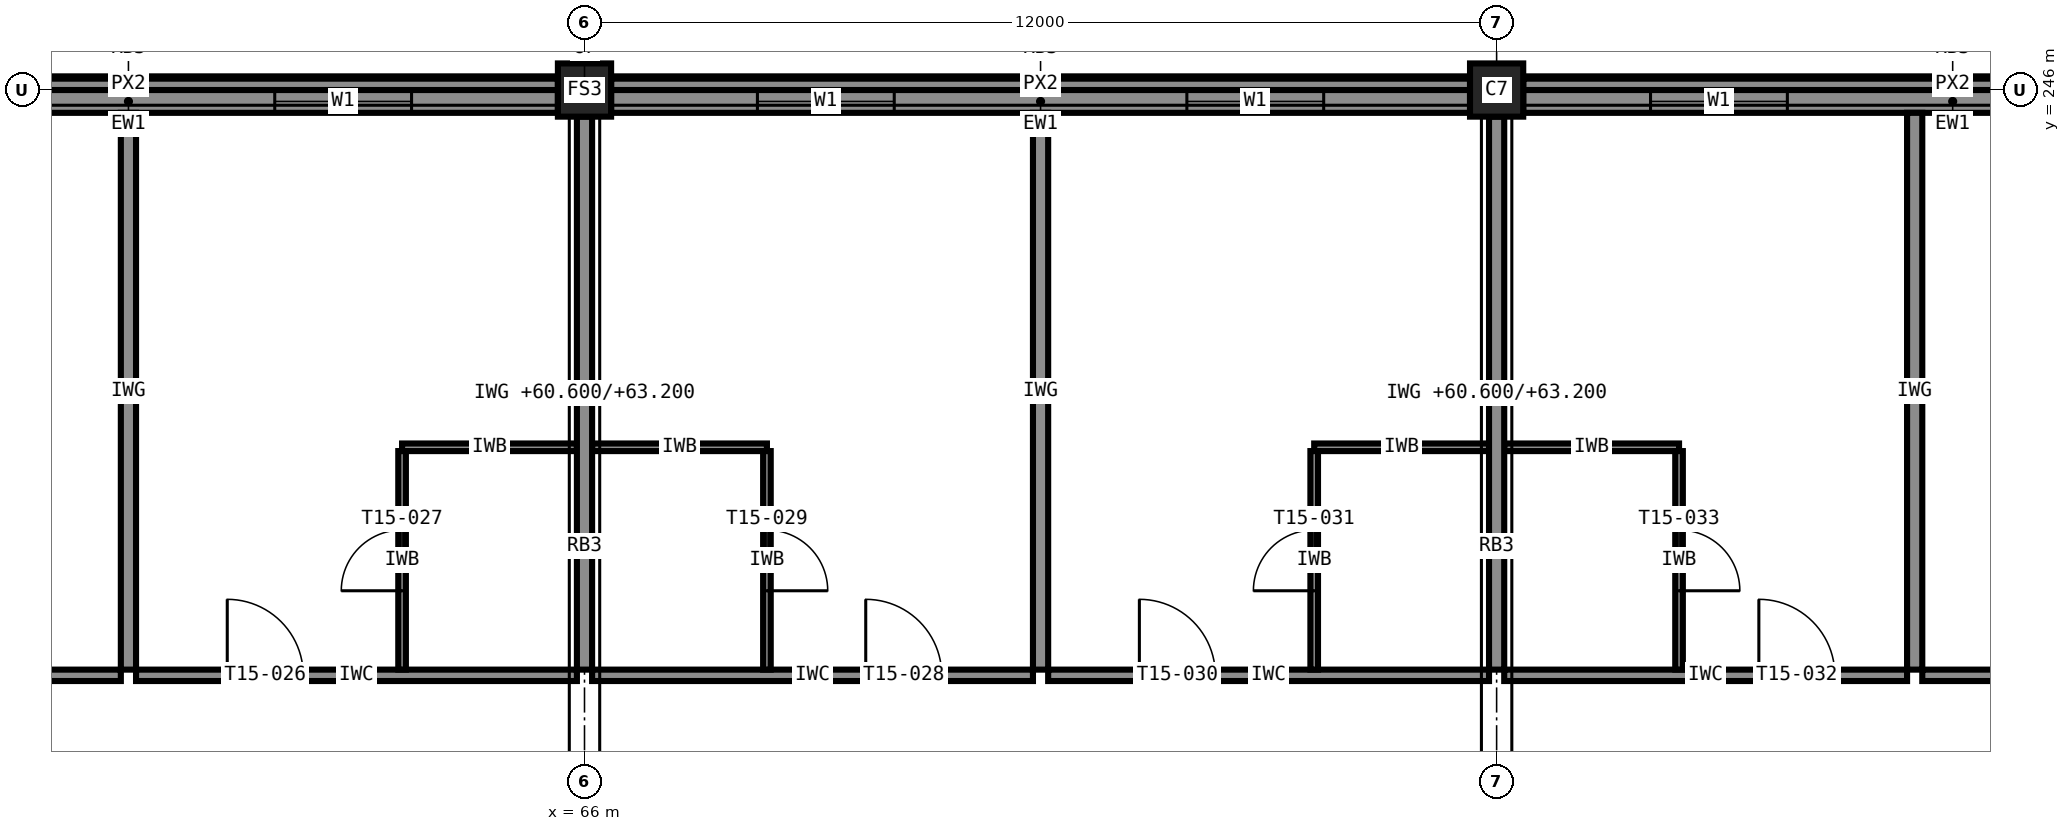
"""IFC4 building model, lengths in metres.
Left out: names, types, materials, properties, quantities, classifications, styles, units other than length and angle.
Written with IfcOpenShell. Run it as: python <this file> out.ifc"""

import sys

from ifc_helpers import new_model, si_unit, direction, frame, frame_2d, origin, origin_2d, place, context, subcontext, project, spatial, rectangle, extrude, element, fill, save


model = new_model("IFC4")
c1 = context("Model", 3, precision=1e-05, world=origin(), true_north=direction((0.0, 1.0)))
c2 = subcontext(c1, "Body", "Model", "MODEL_VIEW")
j1 = project(units=[si_unit("LENGTHUNIT", "METRE"), si_unit("PLANEANGLEUNIT", "RADIAN")], contexts=[c1])
p1 = place(None, origin())
s1 = spatial("IfcSite", under=j1, at=p1, CompositionType="ELEMENT")
p2 = place(p1, origin())
s2 = spatial("IfcBuilding", under=s1, at=p2, CompositionType="ELEMENT")
p3 = place(p2, frame((0.0, 0.0, 60.6)))
s3 = spatial("IfcBuildingStorey", under=s2, at=p3, CompositionType="ELEMENT", Elevation=60.6)
for number, where, z_axis, x_axis in (
    (1, (66.0, 246.0, 0.0), (0.0, 0.0, 1.0), (1.0, 0.0, 0.0)),
    (2, (78.0, 246.0, 0.0), (0.0, 0.0, 1.0), (1.0, 0.0, 0.0)),
):
    element("IfcColumn", number, at=place(p3, frame(where, z_axis=z_axis, x_axis=x_axis)), inside=s3, PredefinedType="COLUMN", context=c2, shape_type="SweptSolid", body=[
        extrude(rectangle(XDim=0.7, YDim=0.7, at=origin_2d()), origin(), (0.0, 0.0, 1.0), 3.6),
    ])
p4 = place(p3, frame((89.65, 245.85, 0.0), z_axis=(0.0, 0.0, 1.0), x_axis=(-1.0, 0.0, 0.0)))
e3 = element("IfcWall", 3, at=p4, inside=s3, PredefinedType="STANDARD", context=c2, shape_type="SweptSolid", body=[
    extrude(rectangle(XDim=11.3, YDim=0.3, at=frame_2d((5.65, 0.0))), origin(), (0.0, 0.0, 1.0), 2.6),
])
p5 = place(p4, frame((7.825, 0.0, 0.85)))
e4 = element("IfcOpeningElement", 4, at=p5, cuts=e3, PredefinedType="OPENING", context=c2, shape_type="SweptSolid", body=[
    extrude(rectangle(XDim=1.8, YDim=1.75, at=frame_2d((0.9, 0.875))), frame((0.0, 0.16, 0.0), z_axis=(0.0, -1.0, 0.0), x_axis=(1.0, 0.0, 0.0)), (0.0, 0.0, 1.0), 0.32),
])
p6 = place(p4, frame((2.25, 0.0, 0.85)))
e5 = element("IfcOpeningElement", 5, at=p6, cuts=e3, PredefinedType="OPENING", context=c2, shape_type="SweptSolid", body=[
    extrude(rectangle(XDim=1.8, YDim=1.75, at=frame_2d((0.9, 0.875))), frame((0.0, 0.16, 0.0), z_axis=(0.0, -1.0, 0.0), x_axis=(1.0, 0.0, 0.0)), (0.0, 0.0, 1.0), 0.32),
])
p7 = place(p3, frame((77.65, 245.85, 0.0), z_axis=(0.0, 0.0, 1.0), x_axis=(-1.0, 0.0, 0.0)))
e6 = element("IfcWall", 6, at=p7, inside=s3, PredefinedType="STANDARD", context=c2, shape_type="SweptSolid", body=[
    extrude(rectangle(XDim=11.3, YDim=0.3, at=frame_2d((5.65, 0.0))), origin(), (0.0, 0.0, 1.0), 2.6),
])
p8 = place(p7, frame((7.575, 0.0, 0.85)))
e7 = element("IfcOpeningElement", 7, at=p8, cuts=e6, PredefinedType="OPENING", context=c2, shape_type="SweptSolid", body=[
    extrude(rectangle(XDim=1.8, YDim=1.75, at=frame_2d((0.9, 0.875))), frame((0.0, 0.16, 0.0), z_axis=(0.0, -1.0, 0.0), x_axis=(1.0, 0.0, 0.0)), (0.0, 0.0, 1.0), 0.32),
])
p9 = place(p7, frame((1.925, 0.0, 0.85)))
e8 = element("IfcOpeningElement", 8, at=p9, cuts=e6, PredefinedType="OPENING", context=c2, shape_type="SweptSolid", body=[
    extrude(rectangle(XDim=1.8, YDim=1.75, at=frame_2d((0.9, 0.875))), frame((0.0, 0.16, 0.0), z_axis=(0.0, -1.0, 0.0), x_axis=(1.0, 0.0, 0.0)), (0.0, 0.0, 1.0), 0.32),
])
p10 = place(p3, frame((65.65, 245.85, 0.0), z_axis=(0.0, 0.0, 1.0), x_axis=(-1.0, 0.0, 0.0)))
e9 = element("IfcWall", 9, at=p10, inside=s3, PredefinedType="STANDARD", context=c2, shape_type="SweptSolid", body=[
    extrude(rectangle(XDim=11.3, YDim=0.3, at=frame_2d((5.65, 0.0))), origin(), (0.0, 0.0, 1.0), 2.6),
])
p11 = place(p10, frame((7.575, 0.0, 0.85)))
e10 = element("IfcOpeningElement", 10, at=p11, cuts=e9, PredefinedType="OPENING", context=c2, shape_type="SweptSolid", body=[
    extrude(rectangle(XDim=1.8, YDim=1.75, at=frame_2d((0.9, 0.875))), frame((0.0, 0.16, 0.0), z_axis=(0.0, -1.0, 0.0), x_axis=(1.0, 0.0, 0.0)), (0.0, 0.0, 1.0), 0.32),
])
p12 = place(p10, frame((1.925, 0.0, 0.85)))
e11 = element("IfcOpeningElement", 11, at=p12, cuts=e9, PredefinedType="OPENING", context=c2, shape_type="SweptSolid", body=[
    extrude(rectangle(XDim=1.8, YDim=1.75, at=frame_2d((0.9, 0.875))), frame((0.0, 0.16, 0.0), z_axis=(0.0, -1.0, 0.0), x_axis=(1.0, 0.0, 0.0)), (0.0, 0.0, 1.0), 0.32),
])
for number, where, z_axis, x_axis in (
    (12, (89.65, 246.075, 3.4), (0.0, 0.0, 1.0), (-1.0, 0.0, 0.0)),
    (13, (77.65, 246.075, 3.4), (0.0, 0.0, 1.0), (-1.0, 0.0, 0.0)),
    (14, (65.65, 246.075, 3.4), (0.0, 0.0, 1.0), (-1.0, 0.0, 0.0)),
):
    element("IfcWall", number, at=place(p3, frame(where, z_axis=z_axis, x_axis=x_axis)), inside=s3, PredefinedType="STANDARD", context=c2, shape_type="SweptSolid", body=[
        extrude(rectangle(XDim=11.3, YDim=0.15, at=frame_2d((5.65, 0.0))), origin(), (0.0, 0.0, 1.0), 0.2),
    ])
p13 = place(p3, frame((54.1, 238.3, 0.0), z_axis=(0.0, 0.0, 1.0), x_axis=(1.0, 0.0, 0.0)))
e15 = element("IfcWall", 15, at=p13, inside=s3, PredefinedType="PARTITIONING", context=c2, shape_type="SweptSolid", body=[
    extrude(rectangle(XDim=5.8, YDim=0.15, at=frame_2d((2.9, 0.0))), origin(), (0.0, 0.0, 1.0), 3.4),
])
p14 = place(p13, frame((3.6, 0.0, 0.0)))
e16 = element("IfcOpeningElement", 16, at=p14, cuts=e15, PredefinedType="OPENING", context=c2, shape_type="SweptSolid", body=[
    extrude(rectangle(XDim=1.0, YDim=2.1, at=frame_2d((0.5, 1.05))), frame((0.0, 0.085, 0.0), z_axis=(0.0, -1.0, 0.0), x_axis=(1.0, 0.0, 0.0)), (0.0, 0.0, 1.0), 0.17),
])
p15 = place(p3, frame((60.1, 238.3, 0.0), z_axis=(0.0, 0.0, 1.0), x_axis=(1.0, 0.0, 0.0)))
e17 = element("IfcWall", 17, at=p15, inside=s3, PredefinedType="PARTITIONING", context=c2, shape_type="SweptSolid", body=[
    extrude(rectangle(XDim=5.8, YDim=0.15, at=frame_2d((2.9, 0.0))), origin(), (0.0, 0.0, 1.0), 3.4),
])
p16 = place(p15, frame((1.2, 0.0, 0.0)))
e18 = element("IfcOpeningElement", 18, at=p16, cuts=e17, PredefinedType="OPENING", context=c2, shape_type="SweptSolid", body=[
    extrude(rectangle(XDim=1.0, YDim=2.1, at=frame_2d((0.5, 1.05))), frame((0.0, 0.085, 0.0), z_axis=(0.0, -1.0, 0.0), x_axis=(1.0, 0.0, 0.0)), (0.0, 0.0, 1.0), 0.17),
])
p17 = place(p3, frame((63.6, 241.3, 0.0), z_axis=(0.0, 0.0, 1.0), x_axis=(1.0, 0.0, 0.0)))
e19 = element("IfcWall", 19, at=p17, inside=s3, PredefinedType="PARTITIONING", context=c2, shape_type="SweptSolid", body=[
    extrude(rectangle(XDim=2.3, YDim=0.1, at=frame_2d((1.15, 0.0))), origin(), (0.0, 0.0, 1.0), 3.4),
])
p18 = place(p3, frame((63.6, 238.375, 0.0), z_axis=(0.0, 0.0, 1.0), x_axis=(0.0, 1.0, 0.0)))
e20 = element("IfcWall", 20, at=p18, inside=s3, PredefinedType="PARTITIONING", context=c2, shape_type="SweptSolid", body=[
    extrude(rectangle(XDim=2.875, YDim=0.1, at=frame_2d((1.438, 0.0))), origin(), (0.0, 0.0, 1.0), 3.4),
])
p19 = place(p18, frame((1.038, 0.0, 0.0)))
e21 = element("IfcOpeningElement", 21, at=p19, cuts=e20, PredefinedType="OPENING", context=c2, shape_type="SweptSolid", body=[
    extrude(rectangle(XDim=0.8, YDim=2.1, at=frame_2d((0.4, 1.05))), frame((0.0, 0.06, 0.0), z_axis=(0.0, -1.0, 0.0), x_axis=(1.0, 0.0, 0.0)), (0.0, 0.0, 1.0), 0.12),
])
p20 = place(p3, frame((66.1, 238.3, 0.0), z_axis=(0.0, 0.0, 1.0), x_axis=(1.0, 0.0, 0.0)))
e22 = element("IfcWall", 22, at=p20, inside=s3, PredefinedType="PARTITIONING", context=c2, shape_type="SweptSolid", body=[
    extrude(rectangle(XDim=5.8, YDim=0.15, at=frame_2d((2.9, 0.0))), origin(), (0.0, 0.0, 1.0), 3.4),
])
p21 = place(p20, frame((3.6, 0.0, 0.0)))
e23 = element("IfcOpeningElement", 23, at=p21, cuts=e22, PredefinedType="OPENING", context=c2, shape_type="SweptSolid", body=[
    extrude(rectangle(XDim=1.0, YDim=2.1, at=frame_2d((0.5, 1.05))), frame((0.0, 0.085, 0.0), z_axis=(0.0, -1.0, 0.0), x_axis=(1.0, 0.0, 0.0)), (0.0, 0.0, 1.0), 0.17),
])
p22 = place(p3, frame((66.1, 241.3, 0.0), z_axis=(0.0, 0.0, 1.0), x_axis=(1.0, 0.0, 0.0)))
e24 = element("IfcWall", 24, at=p22, inside=s3, PredefinedType="PARTITIONING", context=c2, shape_type="SweptSolid", body=[
    extrude(rectangle(XDim=2.3, YDim=0.1, at=frame_2d((1.15, 0.0))), origin(), (0.0, 0.0, 1.0), 3.4),
])
p23 = place(p3, frame((68.4, 241.25, 0.0), z_axis=(0.0, 0.0, 1.0), x_axis=(0.0, -1.0, 0.0)))
e25 = element("IfcWall", 25, at=p23, inside=s3, PredefinedType="PARTITIONING", context=c2, shape_type="SweptSolid", body=[
    extrude(rectangle(XDim=2.875, YDim=0.1, at=frame_2d((1.438, 0.0))), origin(), (0.0, 0.0, 1.0), 3.4),
])
p24 = place(p23, frame((1.038, 0.0, 0.0)))
e26 = element("IfcOpeningElement", 26, at=p24, cuts=e25, PredefinedType="OPENING", context=c2, shape_type="SweptSolid", body=[
    extrude(rectangle(XDim=0.8, YDim=2.1, at=frame_2d((0.4, 1.05))), frame((0.0, 0.06, 0.0), z_axis=(0.0, -1.0, 0.0), x_axis=(1.0, 0.0, 0.0)), (0.0, 0.0, 1.0), 0.12),
])
p25 = place(p3, frame((72.1, 238.3, 0.0), z_axis=(0.0, 0.0, 1.0), x_axis=(1.0, 0.0, 0.0)))
e27 = element("IfcWall", 27, at=p25, inside=s3, PredefinedType="PARTITIONING", context=c2, shape_type="SweptSolid", body=[
    extrude(rectangle(XDim=5.8, YDim=0.15, at=frame_2d((2.9, 0.0))), origin(), (0.0, 0.0, 1.0), 3.4),
])
p26 = place(p25, frame((1.2, 0.0, 0.0)))
e28 = element("IfcOpeningElement", 28, at=p26, cuts=e27, PredefinedType="OPENING", context=c2, shape_type="SweptSolid", body=[
    extrude(rectangle(XDim=1.0, YDim=2.1, at=frame_2d((0.5, 1.05))), frame((0.0, 0.085, 0.0), z_axis=(0.0, -1.0, 0.0), x_axis=(1.0, 0.0, 0.0)), (0.0, 0.0, 1.0), 0.17),
])
p27 = place(p3, frame((75.6, 241.3, 0.0), z_axis=(0.0, 0.0, 1.0), x_axis=(1.0, 0.0, 0.0)))
e29 = element("IfcWall", 29, at=p27, inside=s3, PredefinedType="PARTITIONING", context=c2, shape_type="SweptSolid", body=[
    extrude(rectangle(XDim=2.3, YDim=0.1, at=frame_2d((1.15, 0.0))), origin(), (0.0, 0.0, 1.0), 3.4),
])
p28 = place(p3, frame((75.6, 238.375, 0.0), z_axis=(0.0, 0.0, 1.0), x_axis=(0.0, 1.0, 0.0)))
e30 = element("IfcWall", 30, at=p28, inside=s3, PredefinedType="PARTITIONING", context=c2, shape_type="SweptSolid", body=[
    extrude(rectangle(XDim=2.875, YDim=0.1, at=frame_2d((1.438, 0.0))), origin(), (0.0, 0.0, 1.0), 3.4),
])
p29 = place(p28, frame((1.038, 0.0, 0.0)))
e31 = element("IfcOpeningElement", 31, at=p29, cuts=e30, PredefinedType="OPENING", context=c2, shape_type="SweptSolid", body=[
    extrude(rectangle(XDim=0.8, YDim=2.1, at=frame_2d((0.4, 1.05))), frame((0.0, 0.06, 0.0), z_axis=(0.0, -1.0, 0.0), x_axis=(1.0, 0.0, 0.0)), (0.0, 0.0, 1.0), 0.12),
])
p30 = place(p3, frame((78.1, 238.3, 0.0), z_axis=(0.0, 0.0, 1.0), x_axis=(1.0, 0.0, 0.0)))
e32 = element("IfcWall", 32, at=p30, inside=s3, PredefinedType="PARTITIONING", context=c2, shape_type="SweptSolid", body=[
    extrude(rectangle(XDim=5.3, YDim=0.15, at=frame_2d((2.65, 0.0))), origin(), (0.0, 0.0, 1.0), 3.4),
])
p31 = place(p30, frame((3.35, 0.0, 0.0)))
e33 = element("IfcOpeningElement", 33, at=p31, cuts=e32, PredefinedType="OPENING", context=c2, shape_type="SweptSolid", body=[
    extrude(rectangle(XDim=1.0, YDim=2.1, at=frame_2d((0.5, 1.05))), frame((0.0, 0.085, 0.0), z_axis=(0.0, -1.0, 0.0), x_axis=(1.0, 0.0, 0.0)), (0.0, 0.0, 1.0), 0.17),
])
p32 = place(p3, frame((78.1, 241.3, 0.0), z_axis=(0.0, 0.0, 1.0), x_axis=(1.0, 0.0, 0.0)))
e34 = element("IfcWall", 34, at=p32, inside=s3, PredefinedType="PARTITIONING", context=c2, shape_type="SweptSolid", body=[
    extrude(rectangle(XDim=2.3, YDim=0.1, at=frame_2d((1.15, 0.0))), origin(), (0.0, 0.0, 1.0), 3.4),
])
p33 = place(p3, frame((80.4, 241.25, 0.0), z_axis=(0.0, 0.0, 1.0), x_axis=(0.0, -1.0, 0.0)))
e35 = element("IfcWall", 35, at=p33, inside=s3, PredefinedType="PARTITIONING", context=c2, shape_type="SweptSolid", body=[
    extrude(rectangle(XDim=2.875, YDim=0.1, at=frame_2d((1.438, 0.0))), origin(), (0.0, 0.0, 1.0), 3.4),
])
p34 = place(p33, frame((1.038, 0.0, 0.0)))
e36 = element("IfcOpeningElement", 36, at=p34, cuts=e35, PredefinedType="OPENING", context=c2, shape_type="SweptSolid", body=[
    extrude(rectangle(XDim=0.8, YDim=2.1, at=frame_2d((0.4, 1.05))), frame((0.0, 0.06, 0.0), z_axis=(0.0, -1.0, 0.0), x_axis=(1.0, 0.0, 0.0)), (0.0, 0.0, 1.0), 0.12),
])
p35 = place(p3, frame((83.6, 238.3, 0.0), z_axis=(0.0, 0.0, 1.0), x_axis=(1.0, 0.0, 0.0)))
e37 = element("IfcWall", 37, at=p35, inside=s3, PredefinedType="PARTITIONING", context=c2, shape_type="SweptSolid", body=[
    extrude(rectangle(XDim=6.2, YDim=0.15, at=frame_2d((3.1, 0.0))), origin(), (0.0, 0.0, 1.0), 3.4),
])
p36 = place(p35, frame((1.2, 0.0, 0.0)))
e38 = element("IfcOpeningElement", 38, at=p36, cuts=e37, PredefinedType="OPENING", context=c2, shape_type="SweptSolid", body=[
    extrude(rectangle(XDim=1.0, YDim=2.1, at=frame_2d((0.5, 1.05))), frame((0.0, 0.085, 0.0), z_axis=(0.0, -1.0, 0.0), x_axis=(1.0, 0.0, 0.0)), (0.0, 0.0, 1.0), 0.17),
])
p37 = place(p3, frame((60.0, 245.7, 0.0), z_axis=(0.0, 0.0, 1.0), x_axis=(0.0, -1.0, 0.0)))
e39 = element("IfcWall", 39, at=p37, inside=s3, PredefinedType="PARTITIONING", context=c2, shape_type="SweptSolid", body=[
    extrude(rectangle(XDim=7.325, YDim=0.2, at=frame_2d((3.663, 0.0))), origin(), (0.0, 0.0, 1.0), 3.4),
])
p38 = place(p3, frame((66.0, 245.65, 0.0), z_axis=(0.0, 0.0, 1.0), x_axis=(0.0, -1.0, 0.0)))
e40 = element("IfcWall", 40, at=p38, inside=s3, PredefinedType="PARTITIONING", context=c2, shape_type="SweptSolid", body=[
    extrude(rectangle(XDim=7.275, YDim=0.2, at=frame_2d((3.637, 0.0))), origin(), (0.0, 0.0, 1.0), 2.6),
])
p39 = place(p3, frame((72.0, 245.7, 0.0), z_axis=(0.0, 0.0, 1.0), x_axis=(0.0, -1.0, 0.0)))
e41 = element("IfcWall", 41, at=p39, inside=s3, PredefinedType="PARTITIONING", context=c2, shape_type="SweptSolid", body=[
    extrude(rectangle(XDim=7.325, YDim=0.2, at=frame_2d((3.663, 0.0))), origin(), (0.0, 0.0, 1.0), 3.4),
])
p40 = place(p3, frame((78.0, 245.65, 0.0), z_axis=(0.0, 0.0, 1.0), x_axis=(0.0, -1.0, 0.0)))
e42 = element("IfcWall", 42, at=p40, inside=s3, PredefinedType="PARTITIONING", context=c2, shape_type="SweptSolid", body=[
    extrude(rectangle(XDim=7.275, YDim=0.2, at=frame_2d((3.637, 0.0))), origin(), (0.0, 0.0, 1.0), 2.6),
])
p41 = place(p3, frame((83.5, 245.7, 0.0), z_axis=(0.0, 0.0, 1.0), x_axis=(0.0, -1.0, 0.0)))
e43 = element("IfcWall", 43, at=p41, inside=s3, PredefinedType="PARTITIONING", context=c2, shape_type="SweptSolid", body=[
    extrude(rectangle(XDim=7.325, YDim=0.2, at=frame_2d((3.663, 0.0))), origin(), (0.0, 0.0, 1.0), 3.4),
])
p42 = place(p5, origin())
e44 = element("IfcWindow", 44, at=p42, inside=s3, PartitioningType="SINGLE_PANEL", PredefinedType="WINDOW", context=c2, shape_type="SweptSolid", body=[
    extrude(rectangle(XDim=1.8, YDim=1.75, at=frame_2d((0.9, 0.875))), frame((0.0, 0.03, 0.0), z_axis=(0.0, -1.0, 0.0), x_axis=(1.0, 0.0, 0.0)), (0.0, 0.0, 1.0), 0.06),
])
fill(e4, e44)
p43 = place(p8, origin())
e45 = element("IfcWindow", 45, at=p43, inside=s3, PartitioningType="SINGLE_PANEL", PredefinedType="WINDOW", context=c2, shape_type="SweptSolid", body=[
    extrude(rectangle(XDim=1.8, YDim=1.75, at=frame_2d((0.9, 0.875))), frame((0.0, 0.03, 0.0), z_axis=(0.0, -1.0, 0.0), x_axis=(1.0, 0.0, 0.0)), (0.0, 0.0, 1.0), 0.06),
])
fill(e7, e45)
p44 = place(p9, origin())
e46 = element("IfcWindow", 46, at=p44, inside=s3, PartitioningType="SINGLE_PANEL", PredefinedType="WINDOW", context=c2, shape_type="SweptSolid", body=[
    extrude(rectangle(XDim=1.8, YDim=1.75, at=frame_2d((0.9, 0.875))), frame((0.0, 0.03, 0.0), z_axis=(0.0, -1.0, 0.0), x_axis=(1.0, 0.0, 0.0)), (0.0, 0.0, 1.0), 0.06),
])
fill(e8, e46)
p45 = place(p12, origin())
e47 = element("IfcWindow", 47, at=p45, inside=s3, PartitioningType="SINGLE_PANEL", PredefinedType="WINDOW", context=c2, shape_type="SweptSolid", body=[
    extrude(rectangle(XDim=1.8, YDim=1.75, at=frame_2d((0.9, 0.875))), frame((0.0, 0.03, 0.0), z_axis=(0.0, -1.0, 0.0), x_axis=(1.0, 0.0, 0.0)), (0.0, 0.0, 1.0), 0.06),
])
fill(e11, e47)
p46 = place(p16, origin())
e48 = element("IfcDoor", 48, at=p46, inside=s3, OperationType="SINGLE_SWING_LEFT", PredefinedType="DOOR", context=c2, shape_type="SweptSolid", body=[
    extrude(rectangle(XDim=1.0, YDim=2.1, at=frame_2d((0.5, 1.05))), frame((0.0, 0.025, 0.0), z_axis=(0.0, -1.0, 0.0), x_axis=(1.0, 0.0, 0.0)), (0.0, 0.0, 1.0), 0.05),
])
fill(e18, e48)
p47 = place(p19, origin())
e49 = element("IfcDoor", 49, at=p47, inside=s3, OperationType="SINGLE_SWING_LEFT", PredefinedType="DOOR", context=c2, shape_type="SweptSolid", body=[
    extrude(rectangle(XDim=0.8, YDim=2.1, at=frame_2d((0.4, 1.05))), frame((0.0, 0.025, 0.0), z_axis=(0.0, -1.0, 0.0), x_axis=(1.0, 0.0, 0.0)), (0.0, 0.0, 1.0), 0.05),
])
fill(e21, e49)
p48 = place(p21, origin())
e50 = element("IfcDoor", 50, at=p48, inside=s3, OperationType="SINGLE_SWING_LEFT", PredefinedType="DOOR", context=c2, shape_type="SweptSolid", body=[
    extrude(rectangle(XDim=1.0, YDim=2.1, at=frame_2d((0.5, 1.05))), frame((0.0, 0.025, 0.0), z_axis=(0.0, -1.0, 0.0), x_axis=(1.0, 0.0, 0.0)), (0.0, 0.0, 1.0), 0.05),
])
fill(e23, e50)
p49 = place(p24, origin())
e51 = element("IfcDoor", 51, at=p49, inside=s3, OperationType="SINGLE_SWING_RIGHT", PredefinedType="DOOR", context=c2, shape_type="SweptSolid", body=[
    extrude(rectangle(XDim=0.8, YDim=2.1, at=frame_2d((0.4, 1.05))), frame((0.0, 0.025, 0.0), z_axis=(0.0, -1.0, 0.0), x_axis=(1.0, 0.0, 0.0)), (0.0, 0.0, 1.0), 0.05),
])
fill(e26, e51)
p50 = place(p26, origin())
e52 = element("IfcDoor", 52, at=p50, inside=s3, OperationType="SINGLE_SWING_LEFT", PredefinedType="DOOR", context=c2, shape_type="SweptSolid", body=[
    extrude(rectangle(XDim=1.0, YDim=2.1, at=frame_2d((0.5, 1.05))), frame((0.0, 0.025, 0.0), z_axis=(0.0, -1.0, 0.0), x_axis=(1.0, 0.0, 0.0)), (0.0, 0.0, 1.0), 0.05),
])
fill(e28, e52)
p51 = place(p29, origin())
e53 = element("IfcDoor", 53, at=p51, inside=s3, OperationType="SINGLE_SWING_LEFT", PredefinedType="DOOR", context=c2, shape_type="SweptSolid", body=[
    extrude(rectangle(XDim=0.8, YDim=2.1, at=frame_2d((0.4, 1.05))), frame((0.0, 0.025, 0.0), z_axis=(0.0, -1.0, 0.0), x_axis=(1.0, 0.0, 0.0)), (0.0, 0.0, 1.0), 0.05),
])
fill(e31, e53)
p52 = place(p31, origin())
e54 = element("IfcDoor", 54, at=p52, inside=s3, OperationType="SINGLE_SWING_LEFT", PredefinedType="DOOR", context=c2, shape_type="SweptSolid", body=[
    extrude(rectangle(XDim=1.0, YDim=2.1, at=frame_2d((0.5, 1.05))), frame((0.0, 0.025, 0.0), z_axis=(0.0, -1.0, 0.0), x_axis=(1.0, 0.0, 0.0)), (0.0, 0.0, 1.0), 0.05),
])
fill(e33, e54)
p53 = place(p34, origin())
e55 = element("IfcDoor", 55, at=p53, inside=s3, OperationType="SINGLE_SWING_RIGHT", PredefinedType="DOOR", context=c2, shape_type="SweptSolid", body=[
    extrude(rectangle(XDim=0.8, YDim=2.1, at=frame_2d((0.4, 1.05))), frame((0.0, 0.025, 0.0), z_axis=(0.0, -1.0, 0.0), x_axis=(1.0, 0.0, 0.0)), (0.0, 0.0, 1.0), 0.05),
])
fill(e36, e55)
save(model, sys.argv[1])
